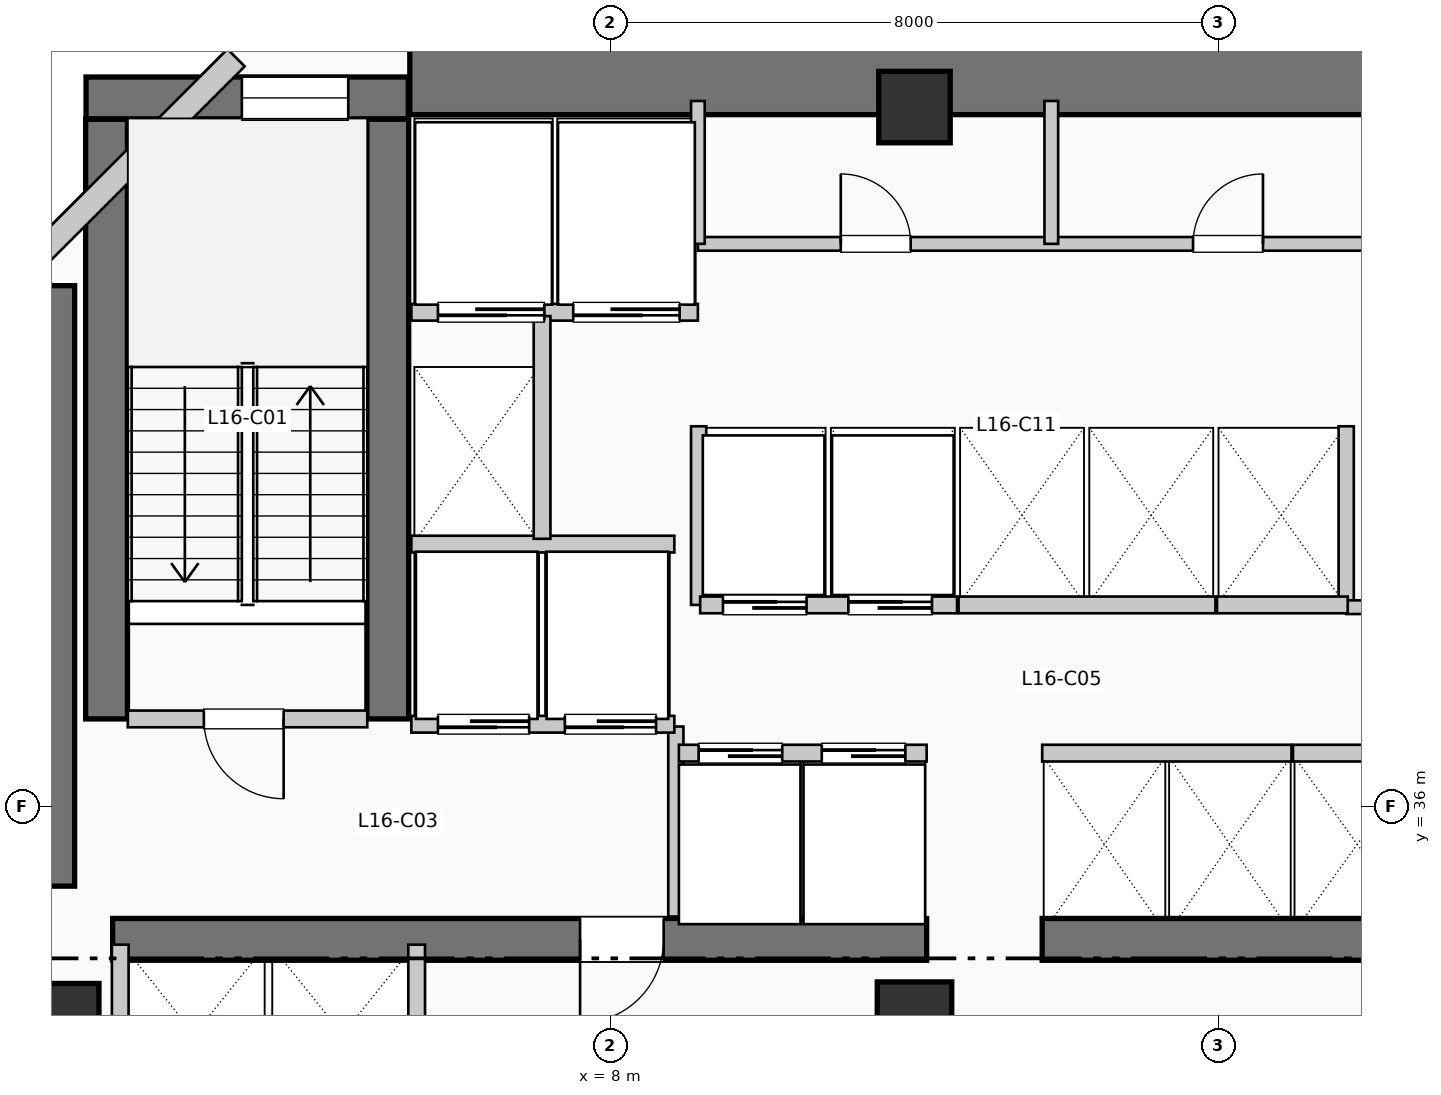
"""IFC4 building model, lengths in metres.
Left out: names, types, materials, properties, quantities, classifications, styles, units other than length and angle.
Written with IfcOpenShell. Run it as: python <this file> out.ifc"""

import sys

from ifc_helpers import new_model, si_unit, direction, frame, frame_2d, origin, origin_2d, place, context, subcontext, project, spatial, rectangle, extrude, element, fill, save


model = new_model("IFC4")
c1 = context("Model", 3, precision=1e-05, world=origin(), true_north=direction((0.0, 1.0)))
c2 = subcontext(c1, "Body", "Model", "MODEL_VIEW")
j1 = project(units=[si_unit("LENGTHUNIT", "METRE"), si_unit("PLANEANGLEUNIT", "RADIAN")], contexts=[c1])
p1 = place(None, origin())
s1 = spatial("IfcSite", under=j1, at=p1, CompositionType="ELEMENT")
p2 = place(p1, origin())
s2 = spatial("IfcBuilding", under=s1, at=p2, CompositionType="ELEMENT")
p3 = place(p2, frame((0.0, 0.0, 69.96)))
s3 = spatial("IfcBuildingStorey", under=s2, at=p3, CompositionType="ELEMENT", Elevation=69.96)
p4 = place(p3, frame((5.36, 45.55, 0.0), z_axis=(0.0, 0.0, 1.0), x_axis=(1.0, 0.0, 0.0)))
e1 = element("IfcWall", 1, at=p4, inside=s3, PredefinedType="SHEAR", context=c2, shape_type="SweptSolid", body=[
    extrude(rectangle(XDim=13.98, YDim=0.9, at=frame_2d((6.99, 0.0))), origin(), (0.0, 0.0, 1.0), 3.96),
])
p5 = place(p3, frame((0.5, 34.95, 0.0), z_axis=(0.0, 0.0, 1.0), x_axis=(0.0, 1.0, 0.0)))
e2 = element("IfcWall", 2, at=p5, inside=s3, PredefinedType="SHEAR", context=c2, shape_type="SweptSolid", body=[
    extrude(rectangle(XDim=7.9, YDim=0.9, at=frame_2d((3.95, 0.0))), origin(), (0.0, 0.0, 1.0), 3.96),
])
p6 = place(p3, frame((1.45, 34.25, 0.0), z_axis=(0.0, 0.0, 1.0), x_axis=(1.0, 0.0, 0.0)))
e3 = element("IfcWall", 3, at=p6, inside=s3, PredefinedType="SHEAR", context=c2, shape_type="SweptSolid", body=[
    extrude(rectangle(XDim=10.71, YDim=0.55, at=frame_2d((5.355, 0.0))), origin(), (0.0, 0.0, 1.0), 3.96),
])
p7 = place(p6, frame((7.25, 0.0, 0.0), z_axis=(0.0, 0.0, 1.0), x_axis=(-1.0, 0.0, 0.0)))
e4 = element("IfcOpeningElement", 4, at=p7, cuts=e3, PredefinedType="OPENING", context=c2, shape_type="SweptSolid", body=[
    extrude(rectangle(XDim=1.1, YDim=2.15, at=frame_2d((0.55, 1.075))), frame((0.0, 0.285, 0.0), z_axis=(0.0, -1.0, 0.0), x_axis=(1.0, 0.0, 0.0)), (0.0, 0.0, 1.0), 0.57),
])
p8 = place(p3, frame((13.68, 34.25, 0.0), z_axis=(0.0, 0.0, 1.0), x_axis=(1.0, 0.0, 0.0)))
e5 = element("IfcWall", 5, at=p8, inside=s3, PredefinedType="SHEAR", context=c2, shape_type="SweptSolid", body=[
    extrude(rectangle(XDim=6.12, YDim=0.55, at=frame_2d((3.06, 0.0))), origin(), (0.0, 0.0, 1.0), 3.96),
])
for number, where, z_axis, x_axis in (
    (6, (1.37, 37.15, 0.0), (0.0, 0.0, 1.0), (0.0, 1.0, 0.0)),
    (7, (5.07, 37.15, 0.0), (0.0, 0.0, 1.0), (0.0, 1.0, 0.0)),
):
    element("IfcWall", number, at=place(p3, frame(where, z_axis=z_axis, x_axis=x_axis)), inside=s3, PredefinedType="SHEAR", context=c2, shape_type="SweptSolid", body=[
        extrude(rectangle(XDim=7.89, YDim=0.55, at=frame_2d((3.945, 0.0))), origin(), (0.0, 0.0, 1.0), 3.96),
    ])
p9 = place(p3, frame((1.1, 45.32, 0.0), z_axis=(0.0, 0.0, 1.0), x_axis=(1.0, 0.0, 0.0)))
e8 = element("IfcWall", 8, at=p9, inside=s3, PredefinedType="SHEAR", context=c2, shape_type="SweptSolid", body=[
    extrude(rectangle(XDim=4.24, YDim=0.55, at=frame_2d((2.12, 0.0))), origin(), (0.0, 0.0, 1.0), 3.96),
])
p10 = place(p9, frame((2.05, 0.0, 1.05)))
e9 = element("IfcOpeningElement", 9, at=p10, cuts=e8, PredefinedType="OPENING", context=c2, shape_type="SweptSolid", body=[
    extrude(rectangle(XDim=1.4, YDim=1.8, at=frame_2d((0.7, 0.9))), frame((0.0, 0.285, 0.0), z_axis=(0.0, -1.0, 0.0), x_axis=(1.0, 0.0, 0.0)), (0.0, 0.0, 1.0), 0.57),
])
p11 = place(p3, frame((0.8, 33.2, 0.0), z_axis=(0.0, 0.0, 1.0), x_axis=(1.0, 0.0, 0.0)))
e10 = element("IfcColumn", 10, at=p11, inside=s3, PredefinedType="COLUMN", context=c2, shape_type="SweptSolid", body=[
    extrude(rectangle(XDim=0.94, YDim=0.94, at=origin_2d()), origin(), (0.0, 0.0, 1.0), 3.96),
])
p12 = place(p3, frame((12.0, 33.2, 0.0), z_axis=(0.0, 0.0, 1.0), x_axis=(1.0, 0.0, 0.0)))
e11 = element("IfcColumn", 11, at=p12, inside=s3, PredefinedType="COLUMN", context=c2, shape_type="SweptSolid", body=[
    extrude(rectangle(XDim=0.98, YDim=0.98, at=origin_2d()), origin(), (0.0, 0.0, 1.0), 3.96),
])
p13 = place(p3, frame((12.0, 45.2, 0.0), z_axis=(0.0, 0.0, 1.0), x_axis=(1.0, 0.0, 0.0)))
e12 = element("IfcColumn", 12, at=p13, inside=s3, PredefinedType="COLUMN", context=c2, shape_type="SweptSolid", body=[
    extrude(rectangle(XDim=0.94, YDim=0.94, at=origin_2d()), origin(), (0.0, 0.0, 1.0), 3.96),
])
p14 = place(p3, frame((3.074, 45.848, 0.0), z_axis=(0.0, 0.0, 1.0), x_axis=(-0.707106781187, -0.707106781187, 0.0)))
e13 = element("IfcWall", 13, at=p14, inside=s3, PredefinedType="SOLIDWALL", context=c2, shape_type="SweptSolid", body=[
    extrude(rectangle(XDim=4.133, YDim=0.32, at=frame_2d((2.066, 0.0))), origin(), (0.0, 0.0, 1.0), 3.71),
])
p15 = place(p3, frame((1.65, 37.15, 0.0), z_axis=(0.0, 0.0, 1.0), x_axis=(1.0, 0.0, 0.0)))
e14 = element("IfcWall", 14, at=p15, inside=s3, PredefinedType="PARTITIONING", context=c2, shape_type="SweptSolid", body=[
    extrude(rectangle(XDim=3.15, YDim=0.22, at=frame_2d((1.575, 0.0))), origin(), (0.0, 0.0, 1.0), 3.71),
])
p16 = place(p15, frame((2.05, 0.0, 0.0), z_axis=(0.0, 0.0, 1.0), x_axis=(-1.0, 0.0, 0.0)))
e15 = element("IfcOpeningElement", 15, at=p16, cuts=e14, PredefinedType="OPENING", context=c2, shape_type="SweptSolid", body=[
    extrude(rectangle(XDim=1.05, YDim=2.15, at=frame_2d((0.525, 1.075))), frame((0.0, 0.12, 0.0), z_axis=(0.0, -1.0, 0.0), x_axis=(1.0, 0.0, 0.0)), (0.0, 0.0, 1.0), 0.24),
])
p17 = place(p3, frame((8.86, 34.55, 0.0), z_axis=(0.0, 0.0, 1.0), x_axis=(0.0, 1.0, 0.0)))
e16 = element("IfcWall", 16, at=p17, inside=s3, PredefinedType="PARTITIONING", context=c2, shape_type="SweptSolid", body=[
    extrude(rectangle(XDim=2.5, YDim=0.2, at=frame_2d((1.25, 0.0))), origin(), (0.0, 0.0, 1.0), 3.71),
])
p18 = place(p3, frame((5.38, 37.08, 0.0), z_axis=(0.0, 0.0, 1.0), x_axis=(1.0, 0.0, 0.0)))
e17 = element("IfcWall", 17, at=p18, inside=s3, PredefinedType="PARTITIONING", context=c2, shape_type="SweptSolid", body=[
    extrude(rectangle(XDim=3.46, YDim=0.22, at=frame_2d((1.73, 0.0))), origin(), (0.0, 0.0, 1.0), 3.71),
])
p19 = place(p18, frame((1.55, 0.0, 0.0), z_axis=(0.0, 0.0, 1.0), x_axis=(-1.0, 0.0, 0.0)))
e18 = element("IfcOpeningElement", 18, at=p19, cuts=e17, PredefinedType="OPENING", context=c2, shape_type="SweptSolid", body=[
    extrude(rectangle(XDim=1.2, YDim=2.2, at=frame_2d((0.6, 1.1))), frame((0.0, 0.12, 0.0), z_axis=(0.0, -1.0, 0.0), x_axis=(1.0, 0.0, 0.0)), (0.0, 0.0, 1.0), 0.24),
])
p20 = place(p18, frame((3.22, 0.0, 0.0), z_axis=(0.0, 0.0, 1.0), x_axis=(-1.0, 0.0, 0.0)))
e19 = element("IfcOpeningElement", 19, at=p20, cuts=e17, PredefinedType="OPENING", context=c2, shape_type="SweptSolid", body=[
    extrude(rectangle(XDim=1.2, YDim=2.2, at=frame_2d((0.6, 1.1))), frame((0.0, 0.12, 0.0), z_axis=(0.0, -1.0, 0.0), x_axis=(1.0, 0.0, 0.0)), (0.0, 0.0, 1.0), 0.24),
])
p21 = place(p3, frame((5.38, 39.45, 0.0), z_axis=(0.0, 0.0, 1.0), x_axis=(1.0, 0.0, 0.0)))
e20 = element("IfcWall", 20, at=p21, inside=s3, PredefinedType="PARTITIONING", context=c2, shape_type="SweptSolid", body=[
    extrude(rectangle(XDim=3.46, YDim=0.22, at=frame_2d((1.73, 0.0))), origin(), (0.0, 0.0, 1.0), 3.71),
])
p22 = place(p3, frame((5.38, 42.5, 0.0), z_axis=(0.0, 0.0, 1.0), x_axis=(1.0, 0.0, 0.0)))
e21 = element("IfcWall", 21, at=p22, inside=s3, PredefinedType="PARTITIONING", context=c2, shape_type="SweptSolid", body=[
    extrude(rectangle(XDim=3.77, YDim=0.22, at=frame_2d((1.885, 0.0))), origin(), (0.0, 0.0, 1.0), 3.71),
])
p23 = place(p22, frame((1.75, 0.0, 0.0), z_axis=(0.0, 0.0, 1.0), x_axis=(-1.0, 0.0, 0.0)))
e22 = element("IfcOpeningElement", 22, at=p23, cuts=e21, PredefinedType="OPENING", context=c2, shape_type="SweptSolid", body=[
    extrude(rectangle(XDim=1.4, YDim=2.2, at=frame_2d((0.7, 1.1))), frame((0.0, 0.12, 0.0), z_axis=(0.0, -1.0, 0.0), x_axis=(1.0, 0.0, 0.0)), (0.0, 0.0, 1.0), 0.24),
])
p24 = place(p22, frame((3.53, 0.0, 0.0), z_axis=(0.0, 0.0, 1.0), x_axis=(-1.0, 0.0, 0.0)))
e23 = element("IfcOpeningElement", 23, at=p24, cuts=e21, PredefinedType="OPENING", context=c2, shape_type="SweptSolid", body=[
    extrude(rectangle(XDim=1.4, YDim=2.2, at=frame_2d((0.7, 1.1))), frame((0.0, 0.12, 0.0), z_axis=(0.0, -1.0, 0.0), x_axis=(1.0, 0.0, 0.0)), (0.0, 0.0, 1.0), 0.24),
])
p25 = place(p3, frame((7.1, 39.52, 0.0), z_axis=(0.0, 0.0, 1.0), x_axis=(0.0, 1.0, 0.0)))
e24 = element("IfcWall", 24, at=p25, inside=s3, PredefinedType="PARTITIONING", context=c2, shape_type="SweptSolid", body=[
    extrude(rectangle(XDim=2.93, YDim=0.22, at=frame_2d((1.465, 0.0))), origin(), (0.0, 0.0, 1.0), 3.71),
])
for number, where, z_axis, x_axis in (
    (25, (1.55, 31.8, 0.0), (0.0, 0.0, 1.0), (0.0, 1.0, 0.0)),
    (26, (5.45, 31.8, 0.0), (0.0, 0.0, 1.0), (0.0, 1.0, 0.0)),
):
    element("IfcWall", number, at=place(p3, frame(where, z_axis=z_axis, x_axis=x_axis)), inside=s3, PredefinedType="PARTITIONING", context=c2, shape_type="SweptSolid", body=[
        extrude(rectangle(XDim=2.38, YDim=0.22, at=frame_2d((1.19, 0.0))), origin(), (0.0, 0.0, 1.0), 3.71),
    ])
for number, where, z_axis, x_axis in (
    (27, (9.16, 38.65, 0.0), (0.0, 0.0, 1.0), (0.0, 1.0, 0.0)),
    (28, (17.68, 38.65, 0.0), (0.0, 0.0, 1.0), (0.0, 1.0, 0.0)),
):
    element("IfcWall", number, at=place(p3, frame(where, z_axis=z_axis, x_axis=x_axis)), inside=s3, PredefinedType="PARTITIONING", context=c2, shape_type="SweptSolid", body=[
        extrude(rectangle(XDim=2.35, YDim=0.2, at=frame_2d((1.175, 0.0))), origin(), (0.0, 0.0, 1.0), 3.71),
    ])
p26 = place(p3, frame((17.68, 38.62, 0.0), z_axis=(0.0, 0.0, 1.0), x_axis=(1.0, 0.0, 0.0)))
e29 = element("IfcWall", 29, at=p26, inside=s3, PredefinedType="PARTITIONING", context=c2, shape_type="SweptSolid", body=[
    extrude(rectangle(XDim=1.84, YDim=0.18, at=frame_2d((0.92, 0.0))), origin(), (0.0, 0.0, 1.0), 3.71),
])
p27 = place(p26, frame((0.24, 0.0, 0.0)))
e30 = element("IfcOpeningElement", 30, at=p27, cuts=e29, PredefinedType="OPENING", context=c2, shape_type="SweptSolid", body=[
    extrude(rectangle(XDim=0.92, YDim=2.1, at=frame_2d((0.46, 1.05))), frame((0.0, 0.1, 0.0), z_axis=(0.0, -1.0, 0.0), x_axis=(1.0, 0.0, 0.0)), (0.0, 0.0, 1.0), 0.2),
])
p28 = place(p3, frame((8.9, 36.7, 0.0), z_axis=(0.0, 0.0, 1.0), x_axis=(1.0, 0.0, 0.0)))
e31 = element("IfcWall", 31, at=p28, inside=s3, PredefinedType="PARTITIONING", context=c2, shape_type="SweptSolid", body=[
    extrude(rectangle(XDim=3.26, YDim=0.22, at=frame_2d((1.63, 0.0))), origin(), (0.0, 0.0, 1.0), 3.71),
])
p29 = place(p28, frame((0.26, 0.0, 0.0)))
e32 = element("IfcOpeningElement", 32, at=p29, cuts=e31, PredefinedType="OPENING", context=c2, shape_type="SweptSolid", body=[
    extrude(rectangle(XDim=1.1, YDim=2.2, at=frame_2d((0.55, 1.1))), frame((0.0, 0.12, 0.0), z_axis=(0.0, -1.0, 0.0), x_axis=(1.0, 0.0, 0.0)), (0.0, 0.0, 1.0), 0.24),
])
p30 = place(p28, frame((1.88, 0.0, 0.0)))
e33 = element("IfcOpeningElement", 33, at=p30, cuts=e31, PredefinedType="OPENING", context=c2, shape_type="SweptSolid", body=[
    extrude(rectangle(XDim=1.1, YDim=2.2, at=frame_2d((0.55, 1.1))), frame((0.0, 0.12, 0.0), z_axis=(0.0, -1.0, 0.0), x_axis=(1.0, 0.0, 0.0)), (0.0, 0.0, 1.0), 0.24),
])
p31 = place(p3, frame((9.18, 38.65, 0.0), z_axis=(0.0, 0.0, 1.0), x_axis=(1.0, 0.0, 0.0)))
e34 = element("IfcWall", 34, at=p31, inside=s3, PredefinedType="PARTITIONING", context=c2, shape_type="SweptSolid", body=[
    extrude(rectangle(XDim=3.38, YDim=0.22, at=frame_2d((1.69, 0.0))), origin(), (0.0, 0.0, 1.0), 3.71),
])
p32 = place(p31, frame((0.3, 0.0, 0.0)))
e35 = element("IfcOpeningElement", 35, at=p32, cuts=e34, PredefinedType="OPENING", context=c2, shape_type="SweptSolid", body=[
    extrude(rectangle(XDim=1.1, YDim=2.2, at=frame_2d((0.55, 1.1))), frame((0.0, 0.12, 0.0), z_axis=(0.0, -1.0, 0.0), x_axis=(1.0, 0.0, 0.0)), (0.0, 0.0, 1.0), 0.24),
])
p33 = place(p31, frame((1.95, 0.0, 0.0)))
e36 = element("IfcOpeningElement", 36, at=p33, cuts=e34, PredefinedType="OPENING", context=c2, shape_type="SweptSolid", body=[
    extrude(rectangle(XDim=1.1, YDim=2.2, at=frame_2d((0.55, 1.1))), frame((0.0, 0.12, 0.0), z_axis=(0.0, -1.0, 0.0), x_axis=(1.0, 0.0, 0.0)), (0.0, 0.0, 1.0), 0.24),
])
p34 = place(p3, frame((13.68, 36.7, 0.0), z_axis=(0.0, 0.0, 1.0), x_axis=(1.0, 0.0, 0.0)))
e37 = element("IfcWall", 37, at=p34, inside=s3, PredefinedType="PARTITIONING", context=c2, shape_type="SweptSolid", body=[
    extrude(rectangle(XDim=3.28, YDim=0.22, at=frame_2d((1.64, 0.0))), origin(), (0.0, 0.0, 1.0), 3.71),
])
p35 = place(p3, frame((12.58, 38.65, 0.0), z_axis=(0.0, 0.0, 1.0), x_axis=(1.0, 0.0, 0.0)))
e38 = element("IfcWall", 38, at=p35, inside=s3, PredefinedType="PARTITIONING", context=c2, shape_type="SweptSolid", body=[
    extrude(rectangle(XDim=3.38, YDim=0.22, at=frame_2d((1.69, 0.0))), origin(), (0.0, 0.0, 1.0), 3.71),
])
p36 = place(p3, frame((16.98, 36.7, 0.0), z_axis=(0.0, 0.0, 1.0), x_axis=(1.0, 0.0, 0.0)))
e39 = element("IfcWall", 39, at=p36, inside=s3, PredefinedType="PARTITIONING", context=c2, shape_type="SweptSolid", body=[
    extrude(rectangle(XDim=1.7, YDim=0.22, at=frame_2d((0.85, 0.0))), origin(), (0.0, 0.0, 1.0), 3.71),
])
p37 = place(p3, frame((15.98, 38.65, 0.0), z_axis=(0.0, 0.0, 1.0), x_axis=(1.0, 0.0, 0.0)))
e40 = element("IfcWall", 40, at=p37, inside=s3, PredefinedType="PARTITIONING", context=c2, shape_type="SweptSolid", body=[
    extrude(rectangle(XDim=1.72, YDim=0.22, at=frame_2d((0.86, 0.0))), origin(), (0.0, 0.0, 1.0), 3.71),
])
p38 = place(p3, frame((9.15, 43.4, 0.0), z_axis=(0.0, 0.0, 1.0), x_axis=(1.0, 0.0, 0.0)))
e41 = element("IfcWall", 41, at=p38, inside=s3, PredefinedType="PLUMBINGWALL", context=c2, shape_type="SweptSolid", body=[
    extrude(rectangle(XDim=9.33, YDim=0.18, at=frame_2d((4.665, 0.0))), origin(), (0.0, 0.0, 1.0), 3.71),
])
p39 = place(p38, frame((1.88, 0.0, 0.0)))
e42 = element("IfcOpeningElement", 42, at=p39, cuts=e41, PredefinedType="OPENING", context=c2, shape_type="SweptSolid", body=[
    extrude(rectangle(XDim=0.92, YDim=2.1, at=frame_2d((0.46, 1.05))), frame((0.0, 0.1, 0.0), z_axis=(0.0, -1.0, 0.0), x_axis=(1.0, 0.0, 0.0)), (0.0, 0.0, 1.0), 0.2),
])
p40 = place(p38, frame((6.515, 0.0, 0.0)))
e43 = element("IfcOpeningElement", 43, at=p40, cuts=e41, PredefinedType="OPENING", context=c2, shape_type="SweptSolid", body=[
    extrude(rectangle(XDim=0.92, YDim=2.1, at=frame_2d((0.46, 1.05))), frame((0.0, 0.1, 0.0), z_axis=(0.0, -1.0, 0.0), x_axis=(1.0, 0.0, 0.0)), (0.0, 0.0, 1.0), 0.2),
])
for number, where, z_axis, x_axis in (
    (44, (9.15, 43.4, 0.0), (0.0, 0.0, 1.0), (0.0, 1.0, 0.0)),
    (45, (13.8, 43.4, 0.0), (0.0, 0.0, 1.0), (0.0, 1.0, 0.0)),
):
    element("IfcWall", number, at=place(p3, frame(where, z_axis=z_axis, x_axis=x_axis)), inside=s3, PredefinedType="PLUMBINGWALL", context=c2, shape_type="SweptSolid", body=[
        extrude(rectangle(XDim=1.88, YDim=0.18, at=frame_2d((0.94, 0.0))), origin(), (0.0, 0.0, 1.0), 3.71),
    ])
p41 = place(p10, origin())
e46 = element("IfcWindow", 46, at=p41, inside=s3, PartitioningType="SINGLE_PANEL", PredefinedType="WINDOW", context=c2, shape_type="SweptSolid", body=[
    extrude(rectangle(XDim=1.4, YDim=1.8, at=frame_2d((0.7, 0.9))), frame((0.0, 0.03, 0.0), z_axis=(0.0, -1.0, 0.0), x_axis=(1.0, 0.0, 0.0)), (0.0, 0.0, 1.0), 0.06),
])
fill(e9, e46)
p42 = place(p16, origin())
e47 = element("IfcDoor", 47, at=p42, inside=s3, OperationType="SINGLE_SWING_RIGHT", PredefinedType="DOOR", context=c2, shape_type="SweptSolid", body=[
    extrude(rectangle(XDim=1.05, YDim=2.15, at=frame_2d((0.525, 1.075))), frame((0.0, 0.025, 0.0), z_axis=(0.0, -1.0, 0.0), x_axis=(1.0, 0.0, 0.0)), (0.0, 0.0, 1.0), 0.05),
])
fill(e15, e47)
p43 = place(p7, origin())
e48 = element("IfcDoor", 48, at=p43, inside=s3, OperationType="SINGLE_SWING_LEFT", PredefinedType="DOOR", context=c2, shape_type="SweptSolid", body=[
    extrude(rectangle(XDim=1.1, YDim=2.15, at=frame_2d((0.55, 1.075))), frame((0.0, 0.025, 0.0), z_axis=(0.0, -1.0, 0.0), x_axis=(1.0, 0.0, 0.0)), (0.0, 0.0, 1.0), 0.05),
])
fill(e4, e48)
p44 = place(p19, origin())
e49 = element("IfcDoor", 49, at=p44, inside=s3, OperationType="SLIDING_TO_RIGHT", PredefinedType="DOOR", context=c2, shape_type="SweptSolid", body=[
    extrude(rectangle(XDim=1.2, YDim=2.2, at=frame_2d((0.6, 1.1))), frame((0.0, 0.025, 0.0), z_axis=(0.0, -1.0, 0.0), x_axis=(1.0, 0.0, 0.0)), (0.0, 0.0, 1.0), 0.05),
])
fill(e18, e49)
p45 = place(p20, origin())
e50 = element("IfcDoor", 50, at=p45, inside=s3, OperationType="SLIDING_TO_RIGHT", PredefinedType="DOOR", context=c2, shape_type="SweptSolid", body=[
    extrude(rectangle(XDim=1.2, YDim=2.2, at=frame_2d((0.6, 1.1))), frame((0.0, 0.025, 0.0), z_axis=(0.0, -1.0, 0.0), x_axis=(1.0, 0.0, 0.0)), (0.0, 0.0, 1.0), 0.05),
])
fill(e19, e50)
p46 = place(p23, origin())
e51 = element("IfcDoor", 51, at=p46, inside=s3, OperationType="SLIDING_TO_LEFT", PredefinedType="DOOR", context=c2, shape_type="SweptSolid", body=[
    extrude(rectangle(XDim=1.4, YDim=2.2, at=frame_2d((0.7, 1.1))), frame((0.0, 0.025, 0.0), z_axis=(0.0, -1.0, 0.0), x_axis=(1.0, 0.0, 0.0)), (0.0, 0.0, 1.0), 0.05),
])
fill(e22, e51)
p47 = place(p24, origin())
e52 = element("IfcDoor", 52, at=p47, inside=s3, OperationType="SLIDING_TO_LEFT", PredefinedType="DOOR", context=c2, shape_type="SweptSolid", body=[
    extrude(rectangle(XDim=1.4, YDim=2.2, at=frame_2d((0.7, 1.1))), frame((0.0, 0.025, 0.0), z_axis=(0.0, -1.0, 0.0), x_axis=(1.0, 0.0, 0.0)), (0.0, 0.0, 1.0), 0.05),
])
fill(e23, e52)
p48 = place(p29, origin())
e53 = element("IfcDoor", 53, at=p48, inside=s3, OperationType="SLIDING_TO_LEFT", PredefinedType="DOOR", context=c2, shape_type="SweptSolid", body=[
    extrude(rectangle(XDim=1.1, YDim=2.2, at=frame_2d((0.55, 1.1))), frame((0.0, 0.025, 0.0), z_axis=(0.0, -1.0, 0.0), x_axis=(1.0, 0.0, 0.0)), (0.0, 0.0, 1.0), 0.05),
])
fill(e32, e53)
p49 = place(p30, origin())
e54 = element("IfcDoor", 54, at=p49, inside=s3, OperationType="SLIDING_TO_LEFT", PredefinedType="DOOR", context=c2, shape_type="SweptSolid", body=[
    extrude(rectangle(XDim=1.1, YDim=2.2, at=frame_2d((0.55, 1.1))), frame((0.0, 0.025, 0.0), z_axis=(0.0, -1.0, 0.0), x_axis=(1.0, 0.0, 0.0)), (0.0, 0.0, 1.0), 0.05),
])
fill(e33, e54)
p50 = place(p32, origin())
e55 = element("IfcDoor", 55, at=p50, inside=s3, OperationType="SLIDING_TO_LEFT", PredefinedType="DOOR", context=c2, shape_type="SweptSolid", body=[
    extrude(rectangle(XDim=1.1, YDim=2.2, at=frame_2d((0.55, 1.1))), frame((0.0, 0.025, 0.0), z_axis=(0.0, -1.0, 0.0), x_axis=(1.0, 0.0, 0.0)), (0.0, 0.0, 1.0), 0.05),
])
fill(e35, e55)
p51 = place(p33, origin())
e56 = element("IfcDoor", 56, at=p51, inside=s3, OperationType="SLIDING_TO_LEFT", PredefinedType="DOOR", context=c2, shape_type="SweptSolid", body=[
    extrude(rectangle(XDim=1.1, YDim=2.2, at=frame_2d((0.55, 1.1))), frame((0.0, 0.025, 0.0), z_axis=(0.0, -1.0, 0.0), x_axis=(1.0, 0.0, 0.0)), (0.0, 0.0, 1.0), 0.05),
])
fill(e36, e56)
p52 = place(p39, origin())
e57 = element("IfcDoor", 57, at=p52, inside=s3, OperationType="SINGLE_SWING_LEFT", PredefinedType="DOOR", context=c2, shape_type="SweptSolid", body=[
    extrude(rectangle(XDim=0.92, YDim=2.1, at=frame_2d((0.46, 1.05))), frame((0.0, 0.025, 0.0), z_axis=(0.0, -1.0, 0.0), x_axis=(1.0, 0.0, 0.0)), (0.0, 0.0, 1.0), 0.05),
])
fill(e42, e57)
p53 = place(p40, origin())
e58 = element("IfcDoor", 58, at=p53, inside=s3, OperationType="SINGLE_SWING_RIGHT", PredefinedType="DOOR", context=c2, shape_type="SweptSolid", body=[
    extrude(rectangle(XDim=0.92, YDim=2.1, at=frame_2d((0.46, 1.05))), frame((0.0, 0.025, 0.0), z_axis=(0.0, -1.0, 0.0), x_axis=(1.0, 0.0, 0.0)), (0.0, 0.0, 1.0), 0.05),
])
fill(e43, e58)
save(model, sys.argv[1])
